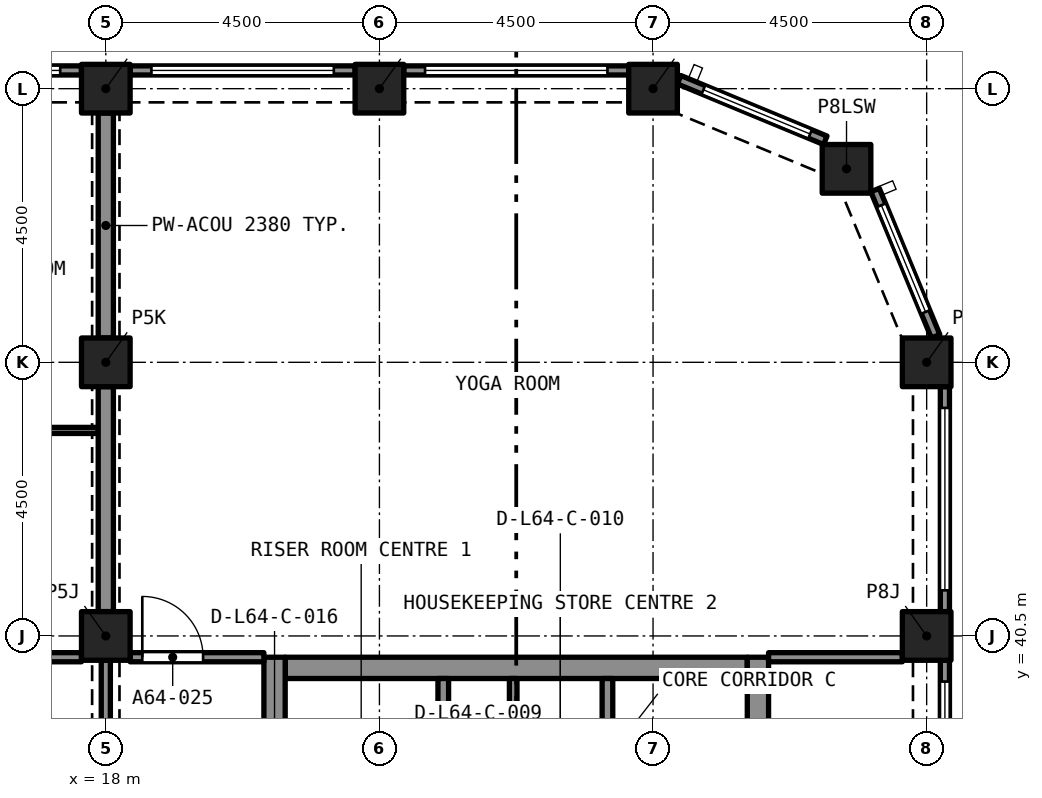
"""IFC4 building model, lengths in metres.
Left out: names, types, materials, properties, quantities, classifications, styles, units other than length and angle.
Written with IfcOpenShell. Run it as: python <this file> out.ifc"""

import sys

from ifc_helpers import new_model, si_unit, direction, frame, frame_2d, origin, origin_2d, place, context, subcontext, project, spatial, rectangle, extrude, element, fill, save


model = new_model("IFC4")
c1 = context("Model", 3, precision=1e-05, world=origin(), true_north=direction((0.0, 1.0)))
c2 = subcontext(c1, "Body", "Model", "MODEL_VIEW")
j1 = project(units=[si_unit("LENGTHUNIT", "METRE"), si_unit("PLANEANGLEUNIT", "RADIAN")], contexts=[c1])
p1 = place(None, origin())
s1 = spatial("IfcSite", under=j1, at=p1, CompositionType="ELEMENT")
p2 = place(p1, origin())
s2 = spatial("IfcBuilding", under=s1, at=p2, CompositionType="ELEMENT")
p3 = place(p2, frame((0.0, 0.0, 229.295)))
s3 = spatial("IfcBuildingStorey", under=s2, at=p3, CompositionType="ELEMENT", Elevation=229.295)
for number, where, z_axis, x_axis in (
    (1, (18.0, 40.5, 0.0), (0.0, 0.0, 1.0), (1.0, 0.0, 0.0)),
    (2, (31.5, 40.5, 0.0), (0.0, 0.0, 1.0), (1.0, 0.0, 0.0)),
    (3, (18.0, 45.0, 0.0), (0.0, 0.0, 1.0), (1.0, 0.0, 0.0)),
    (4, (31.5, 45.0, 0.0), (0.0, 0.0, 1.0), (1.0, 0.0, 0.0)),
    (5, (30.182, 48.182, 0.0), (0.0, 0.0, 1.0), (1.0, 0.0, 0.0)),
    (6, (18.0, 49.5, 0.0), (0.0, 0.0, 1.0), (1.0, 0.0, 0.0)),
    (7, (22.5, 49.5, 0.0), (0.0, 0.0, 1.0), (1.0, 0.0, 0.0)),
    (8, (27.0, 49.5, 0.0), (0.0, 0.0, 1.0), (1.0, 0.0, 0.0)),
):
    element("IfcColumn", number, at=place(p3, frame(where, z_axis=z_axis, x_axis=x_axis)), inside=s3, PredefinedType="COLUMN", context=c2, shape_type="SweptSolid", body=[
        extrude(rectangle(XDim=0.8, YDim=0.8, at=origin_2d()), origin(), (0.0, 0.0, 1.0), 3.2),
    ])
p4 = place(p3, frame((20.95, 39.975, 0.0), z_axis=(0.0, 0.0, 1.0), x_axis=(1.0, 0.0, 0.0)))
e9 = element("IfcWall", 9, at=p4, inside=s3, PredefinedType="SOLIDWALL", context=c2, shape_type="SweptSolid", body=[
    extrude(rectangle(XDim=7.6, YDim=0.35, at=frame_2d((3.8, 0.0))), origin(), (0.0, 0.0, 1.0), 3.2),
])
p5 = place(p3, frame((20.775, 27.35, 0.0), z_axis=(0.0, 0.0, 1.0), x_axis=(0.0, 1.0, 0.0)))
e10 = element("IfcWall", 10, at=p5, inside=s3, PredefinedType="SOLIDWALL", context=c2, shape_type="SweptSolid", body=[
    extrude(rectangle(XDim=12.8, YDim=0.35, at=frame_2d((6.4, 0.0))), origin(), (0.0, 0.0, 1.0), 3.2),
])
p6 = place(p5, frame((8.6, 0.0, 0.0)))
e11 = element("IfcOpeningElement", 11, at=p6, cuts=e10, PredefinedType="OPENING", context=c2, shape_type="SweptSolid", body=[
    extrude(rectangle(XDim=1.2, YDim=2.1, at=frame_2d((0.6, 1.05))), frame((0.0, 0.185, 0.0), z_axis=(0.0, -1.0, 0.0), x_axis=(1.0, 0.0, 0.0)), (0.0, 0.0, 1.0), 0.37),
])
p7 = place(p3, frame((28.725, 27.35, 0.0), z_axis=(0.0, 0.0, 1.0), x_axis=(0.0, 1.0, 0.0)))
e12 = element("IfcWall", 12, at=p7, inside=s3, PredefinedType="SOLIDWALL", context=c2, shape_type="SweptSolid", body=[
    extrude(rectangle(XDim=12.8, YDim=0.35, at=frame_2d((6.4, 0.0))), origin(), (0.0, 0.0, 1.0), 3.2),
])
p8 = place(p7, frame((8.6, 0.0, 0.0)))
e13 = element("IfcOpeningElement", 13, at=p8, cuts=e12, PredefinedType="OPENING", context=c2, shape_type="SweptSolid", body=[
    extrude(rectangle(XDim=1.2, YDim=2.1, at=frame_2d((0.6, 1.05))), frame((0.0, 0.185, 0.0), z_axis=(0.0, -1.0, 0.0), x_axis=(1.0, 0.0, 0.0)), (0.0, 0.0, 1.0), 0.37),
])
p9 = place(p3, frame((31.8, 40.1, 0.0), z_axis=(0.0, 0.0, 1.0), x_axis=(0.0, -1.0, 0.0)))
e14 = element("IfcWall", 14, at=p9, inside=s3, PredefinedType="SOLIDWALL", context=c2, shape_type="SweptSolid", body=[
    extrude(rectangle(XDim=3.7, YDim=0.15, at=frame_2d((1.85, 0.0))), origin(), (0.0, 0.0, 1.0), 3.2),
])
p10 = place(p9, frame((0.35, 0.0, 0.45)))
e15 = element("IfcOpeningElement", 15, at=p10, cuts=e14, PredefinedType="OPENING", context=c2, shape_type="SweptSolid", body=[
    extrude(rectangle(XDim=3.0, YDim=1.95, at=frame_2d((1.5, 0.975))), frame((0.0, 0.085, 0.0), z_axis=(0.0, -1.0, 0.0), x_axis=(1.0, 0.0, 0.0)), (0.0, 0.0, 1.0), 0.17),
])
p11 = place(p3, frame((31.8, 44.6, 0.0), z_axis=(0.0, 0.0, 1.0), x_axis=(0.0, -1.0, 0.0)))
e16 = element("IfcWall", 16, at=p11, inside=s3, PredefinedType="SOLIDWALL", context=c2, shape_type="SweptSolid", body=[
    extrude(rectangle(XDim=3.7, YDim=0.15, at=frame_2d((1.85, 0.0))), origin(), (0.0, 0.0, 1.0), 3.2),
])
p12 = place(p11, frame((0.35, 0.0, 0.45)))
e17 = element("IfcOpeningElement", 17, at=p12, cuts=e16, PredefinedType="OPENING", context=c2, shape_type="SweptSolid", body=[
    extrude(rectangle(XDim=3.0, YDim=1.95, at=frame_2d((1.5, 0.975))), frame((0.0, 0.085, 0.0), z_axis=(0.0, -1.0, 0.0), x_axis=(1.0, 0.0, 0.0)), (0.0, 0.0, 1.0), 0.17),
])
p13 = place(p3, frame((30.651, 47.833, 0.0), z_axis=(0.0, 0.0, 1.0), x_axis=(0.382669406082, -0.923885342263, 0.0)))
e18 = element("IfcWall", 18, at=p13, inside=s3, PredefinedType="SOLIDWALL", context=c2, shape_type="SweptSolid", body=[
    extrude(rectangle(XDim=2.602, YDim=0.15, at=frame_2d((1.301, 0.0))), origin(), (0.0, 0.0, 1.0), 3.2),
])
p14 = place(p13, frame((0.27, 0.0, 0.45)))
e19 = element("IfcOpeningElement", 19, at=p14, cuts=e18, PredefinedType="OPENING", context=c2, shape_type="SweptSolid", body=[
    extrude(rectangle(XDim=1.9, YDim=1.95, at=frame_2d((0.95, 0.975))), frame((0.0, 0.085, 0.0), z_axis=(0.0, -1.0, 0.0), x_axis=(1.0, 0.0, 0.0)), (0.0, 0.0, 1.0), 0.17),
])
p15 = place(p3, frame((27.429, 49.647, 0.0), z_axis=(0.0, 0.0, 1.0), x_axis=(0.923885342263, -0.382669406082, 0.0)))
e20 = element("IfcWall", 20, at=p15, inside=s3, PredefinedType="SOLIDWALL", context=c2, shape_type="SweptSolid", body=[
    extrude(rectangle(XDim=2.602, YDim=0.15, at=frame_2d((1.301, 0.0))), origin(), (0.0, 0.0, 1.0), 3.2),
])
p16 = place(p15, frame((0.432, 0.0, 0.45)))
e21 = element("IfcOpeningElement", 21, at=p16, cuts=e20, PredefinedType="OPENING", context=c2, shape_type="SweptSolid", body=[
    extrude(rectangle(XDim=1.9, YDim=1.95, at=frame_2d((0.95, 0.975))), frame((0.0, 0.085, 0.0), z_axis=(0.0, -1.0, 0.0), x_axis=(1.0, 0.0, 0.0)), (0.0, 0.0, 1.0), 0.17),
])
p17 = place(p3, frame((22.9, 49.8, 0.0), z_axis=(0.0, 0.0, 1.0), x_axis=(1.0, 0.0, 0.0)))
e22 = element("IfcWall", 22, at=p17, inside=s3, PredefinedType="SOLIDWALL", context=c2, shape_type="SweptSolid", body=[
    extrude(rectangle(XDim=3.7, YDim=0.15, at=frame_2d((1.85, 0.0))), origin(), (0.0, 0.0, 1.0), 3.2),
])
p18 = place(p17, frame((0.35, 0.0, 0.45)))
e23 = element("IfcOpeningElement", 23, at=p18, cuts=e22, PredefinedType="OPENING", context=c2, shape_type="SweptSolid", body=[
    extrude(rectangle(XDim=3.0, YDim=1.95, at=frame_2d((1.5, 0.975))), frame((0.0, 0.085, 0.0), z_axis=(0.0, -1.0, 0.0), x_axis=(1.0, 0.0, 0.0)), (0.0, 0.0, 1.0), 0.17),
])
p19 = place(p3, frame((18.4, 49.8, 0.0), z_axis=(0.0, 0.0, 1.0), x_axis=(1.0, 0.0, 0.0)))
e24 = element("IfcWall", 24, at=p19, inside=s3, PredefinedType="SOLIDWALL", context=c2, shape_type="SweptSolid", body=[
    extrude(rectangle(XDim=3.7, YDim=0.15, at=frame_2d((1.85, 0.0))), origin(), (0.0, 0.0, 1.0), 3.2),
])
p20 = place(p19, frame((0.35, 0.0, 0.45)))
e25 = element("IfcOpeningElement", 25, at=p20, cuts=e24, PredefinedType="OPENING", context=c2, shape_type="SweptSolid", body=[
    extrude(rectangle(XDim=3.0, YDim=1.95, at=frame_2d((1.5, 0.975))), frame((0.0, 0.085, 0.0), z_axis=(0.0, -1.0, 0.0), x_axis=(1.0, 0.0, 0.0)), (0.0, 0.0, 1.0), 0.17),
])
p21 = place(p3, frame((13.9, 49.8, 0.0), z_axis=(0.0, 0.0, 1.0), x_axis=(1.0, 0.0, 0.0)))
e26 = element("IfcWall", 26, at=p21, inside=s3, PredefinedType="SOLIDWALL", context=c2, shape_type="SweptSolid", body=[
    extrude(rectangle(XDim=3.7, YDim=0.15, at=frame_2d((1.85, 0.0))), origin(), (0.0, 0.0, 1.0), 3.2),
])
p22 = place(p21, frame((0.35, 0.0, 0.45)))
e27 = element("IfcOpeningElement", 27, at=p22, cuts=e26, PredefinedType="OPENING", context=c2, shape_type="SweptSolid", body=[
    extrude(rectangle(XDim=3.0, YDim=1.95, at=frame_2d((1.5, 0.975))), frame((0.0, 0.085, 0.0), z_axis=(0.0, -1.0, 0.0), x_axis=(1.0, 0.0, 0.0)), (0.0, 0.0, 1.0), 0.17),
])
p23 = place(p3, frame((13.5, 43.88, 0.0), z_axis=(0.0, 0.0, 1.0), x_axis=(1.0, 0.0, 0.0)))
e28 = element("IfcWall", 28, at=p23, inside=s3, PredefinedType="PARTITIONING", context=c2, shape_type="SweptSolid", body=[
    extrude(rectangle(XDim=4.375, YDim=0.1, at=frame_2d((2.188, 0.0))), origin(), (0.0, 0.0, 1.0), 2.9),
])
p24 = place(p23, frame((1.8, 0.0, 0.0)))
e29 = element("IfcOpeningElement", 29, at=p24, cuts=e28, PredefinedType="OPENING", context=c2, shape_type="SweptSolid", body=[
    extrude(rectangle(XDim=0.9, YDim=2.1, at=frame_2d((0.45, 1.05))), frame((0.0, 0.06, 0.0), z_axis=(0.0, -1.0, 0.0), x_axis=(1.0, 0.0, 0.0)), (0.0, 0.0, 1.0), 0.12),
])
for number, where, z_axis, x_axis in (
    (30, (18.0, 45.4, 0.0), (0.0, 0.0, 1.0), (0.0, 1.0, 0.0)),
    (31, (18.0, 40.9, 0.0), (0.0, 0.0, 1.0), (0.0, 1.0, 0.0)),
):
    element("IfcWall", number, at=place(p3, frame(where, z_axis=z_axis, x_axis=x_axis)), inside=s3, PredefinedType="PARTITIONING", context=c2, shape_type="SweptSolid", body=[
        extrude(rectangle(XDim=3.7, YDim=0.25, at=frame_2d((1.85, 0.0))), origin(), (0.0, 0.0, 1.0), 2.38),
    ])
p25 = place(p3, frame((14.95, 40.15, 0.0), z_axis=(0.0, 0.0, 1.0), x_axis=(1.0, 0.0, 0.0)))
e32 = element("IfcWall", 32, at=p25, inside=s3, PredefinedType="PARTITIONING", context=c2, shape_type="SweptSolid", body=[
    extrude(rectangle(XDim=2.65, YDim=0.15, at=frame_2d((1.325, 0.0))), origin(), (0.0, 0.0, 1.0), 2.9),
])
p26 = place(p25, frame((0.2, 0.0, 0.0)))
e33 = element("IfcOpeningElement", 33, at=p26, cuts=e32, PredefinedType="OPENING", context=c2, shape_type="SweptSolid", body=[
    extrude(rectangle(XDim=1.2, YDim=2.4, at=frame_2d((0.6, 1.2))), frame((0.0, 0.085, 0.0), z_axis=(0.0, -1.0, 0.0), x_axis=(1.0, 0.0, 0.0)), (0.0, 0.0, 1.0), 0.17),
])
p27 = place(p3, frame((18.4, 40.15, 0.0), z_axis=(0.0, 0.0, 1.0), x_axis=(1.0, 0.0, 0.0)))
e34 = element("IfcWall", 34, at=p27, inside=s3, PredefinedType="PARTITIONING", context=c2, shape_type="SweptSolid", body=[
    extrude(rectangle(XDim=2.2, YDim=0.15, at=frame_2d((1.1, 0.0))), origin(), (0.0, 0.0, 1.0), 2.75),
])
p28 = place(p27, frame((0.2, 0.0, 0.0)))
e35 = element("IfcOpeningElement", 35, at=p28, cuts=e34, PredefinedType="OPENING", context=c2, shape_type="SweptSolid", body=[
    extrude(rectangle(XDim=1.0, YDim=2.1, at=frame_2d((0.5, 1.05))), frame((0.0, 0.085, 0.0), z_axis=(0.0, -1.0, 0.0), x_axis=(1.0, 0.0, 0.0)), (0.0, 0.0, 1.0), 0.17),
])
p29 = place(p3, frame((28.9, 40.15, 0.0), z_axis=(0.0, 0.0, 1.0), x_axis=(1.0, 0.0, 0.0)))
e36 = element("IfcWall", 36, at=p29, inside=s3, PredefinedType="PARTITIONING", context=c2, shape_type="SweptSolid", body=[
    extrude(rectangle(XDim=2.2, YDim=0.15, at=frame_2d((1.1, 0.0))), origin(), (0.0, 0.0, 1.0), 2.75),
])
p30 = place(p3, frame((18.0, 40.1, 0.0), z_axis=(0.0, 0.0, 1.0), x_axis=(0.0, -1.0, 0.0)))
e37 = element("IfcWall", 37, at=p30, inside=s3, PredefinedType="PARTITIONING", context=c2, shape_type="SweptSolid", body=[
    extrude(rectangle(XDim=3.7, YDim=0.15, at=frame_2d((1.85, 0.0))), origin(), (0.0, 0.0, 1.0), 2.38),
])
p31 = place(p30, frame((1.25, 0.0, 0.0)))
e38 = element("IfcOpeningElement", 38, at=p31, cuts=e37, PredefinedType="OPENING", context=c2, shape_type="SweptSolid", body=[
    extrude(rectangle(XDim=1.2, YDim=2.1, at=frame_2d((0.6, 1.05))), frame((0.0, 0.085, 0.0), z_axis=(0.0, -1.0, 0.0), x_axis=(1.0, 0.0, 0.0)), (0.0, 0.0, 1.0), 0.17),
])
for number, where, z_axis, x_axis in (
    (39, (23.55, 37.5, 0.0), (0.0, 0.0, 1.0), (0.0, 1.0, 0.0)),
    (40, (26.25, 37.5, 0.0), (0.0, 0.0, 1.0), (0.0, 1.0, 0.0)),
):
    element("IfcWall", number, at=place(p3, frame(where, z_axis=z_axis, x_axis=x_axis)), inside=s3, PredefinedType="SOLIDWALL", context=c2, shape_type="SweptSolid", body=[
        extrude(rectangle(XDim=2.3, YDim=0.175, at=frame_2d((1.15, 0.0))), origin(), (0.0, 0.0, 1.0), 2.9),
    ])
p32 = place(p3, frame((24.7, 37.5, 0.0), z_axis=(0.0, 0.0, 1.0), x_axis=(0.0, 1.0, 0.0)))
e41 = element("IfcWall", 41, at=p32, inside=s3, PredefinedType="PARTITIONING", context=c2, shape_type="SweptSolid", body=[
    extrude(rectangle(XDim=2.3, YDim=0.125, at=frame_2d((1.15, 0.0))), origin(), (0.0, 0.0, 1.0), 2.9),
])
p33 = place(p10, origin())
e42 = element("IfcWindow", 42, at=p33, inside=s3, PartitioningType="SINGLE_PANEL", PredefinedType="WINDOW", context=c2, shape_type="SweptSolid", body=[
    extrude(rectangle(XDim=3.0, YDim=1.95, at=frame_2d((1.5, 0.975))), frame((0.0, 0.03, 0.0), z_axis=(0.0, -1.0, 0.0), x_axis=(1.0, 0.0, 0.0)), (0.0, 0.0, 1.0), 0.06),
])
fill(e15, e42)
p34 = place(p12, origin())
e43 = element("IfcWindow", 43, at=p34, inside=s3, PartitioningType="SINGLE_PANEL", PredefinedType="WINDOW", context=c2, shape_type="SweptSolid", body=[
    extrude(rectangle(XDim=3.0, YDim=1.95, at=frame_2d((1.5, 0.975))), frame((0.0, 0.03, 0.0), z_axis=(0.0, -1.0, 0.0), x_axis=(1.0, 0.0, 0.0)), (0.0, 0.0, 1.0), 0.06),
])
fill(e17, e43)
p35 = place(p14, origin())
e44 = element("IfcWindow", 44, at=p35, inside=s3, PartitioningType="SINGLE_PANEL", PredefinedType="WINDOW", context=c2, shape_type="SweptSolid", body=[
    extrude(rectangle(XDim=1.9, YDim=1.95, at=frame_2d((0.95, 0.975))), frame((0.0, 0.03, 0.0), z_axis=(0.0, -1.0, 0.0), x_axis=(1.0, 0.0, 0.0)), (0.0, 0.0, 1.0), 0.06),
])
fill(e19, e44)
p36 = place(p16, origin())
e45 = element("IfcWindow", 45, at=p36, inside=s3, PartitioningType="SINGLE_PANEL", PredefinedType="WINDOW", context=c2, shape_type="SweptSolid", body=[
    extrude(rectangle(XDim=1.9, YDim=1.95, at=frame_2d((0.95, 0.975))), frame((0.0, 0.03, 0.0), z_axis=(0.0, -1.0, 0.0), x_axis=(1.0, 0.0, 0.0)), (0.0, 0.0, 1.0), 0.06),
])
fill(e21, e45)
p37 = place(p18, origin())
e46 = element("IfcWindow", 46, at=p37, inside=s3, PartitioningType="SINGLE_PANEL", PredefinedType="WINDOW", context=c2, shape_type="SweptSolid", body=[
    extrude(rectangle(XDim=3.0, YDim=1.95, at=frame_2d((1.5, 0.975))), frame((0.0, 0.03, 0.0), z_axis=(0.0, -1.0, 0.0), x_axis=(1.0, 0.0, 0.0)), (0.0, 0.0, 1.0), 0.06),
])
fill(e23, e46)
p38 = place(p20, origin())
e47 = element("IfcWindow", 47, at=p38, inside=s3, PartitioningType="SINGLE_PANEL", PredefinedType="WINDOW", context=c2, shape_type="SweptSolid", body=[
    extrude(rectangle(XDim=3.0, YDim=1.95, at=frame_2d((1.5, 0.975))), frame((0.0, 0.03, 0.0), z_axis=(0.0, -1.0, 0.0), x_axis=(1.0, 0.0, 0.0)), (0.0, 0.0, 1.0), 0.06),
])
fill(e25, e47)
p39 = place(p22, origin())
e48 = element("IfcWindow", 48, at=p39, inside=s3, PartitioningType="SINGLE_PANEL", PredefinedType="WINDOW", context=c2, shape_type="SweptSolid", body=[
    extrude(rectangle(XDim=3.0, YDim=1.95, at=frame_2d((1.5, 0.975))), frame((0.0, 0.03, 0.0), z_axis=(0.0, -1.0, 0.0), x_axis=(1.0, 0.0, 0.0)), (0.0, 0.0, 1.0), 0.06),
])
fill(e27, e48)
p40 = place(p28, origin())
e49 = element("IfcDoor", 49, at=p40, inside=s3, OperationType="SINGLE_SWING_LEFT", PredefinedType="DOOR", context=c2, shape_type="SweptSolid", body=[
    extrude(rectangle(XDim=1.0, YDim=2.1, at=frame_2d((0.5, 1.05))), frame((0.0, 0.025, 0.0), z_axis=(0.0, -1.0, 0.0), x_axis=(1.0, 0.0, 0.0)), (0.0, 0.0, 1.0), 0.05),
])
fill(e35, e49)
save(model, sys.argv[1])
